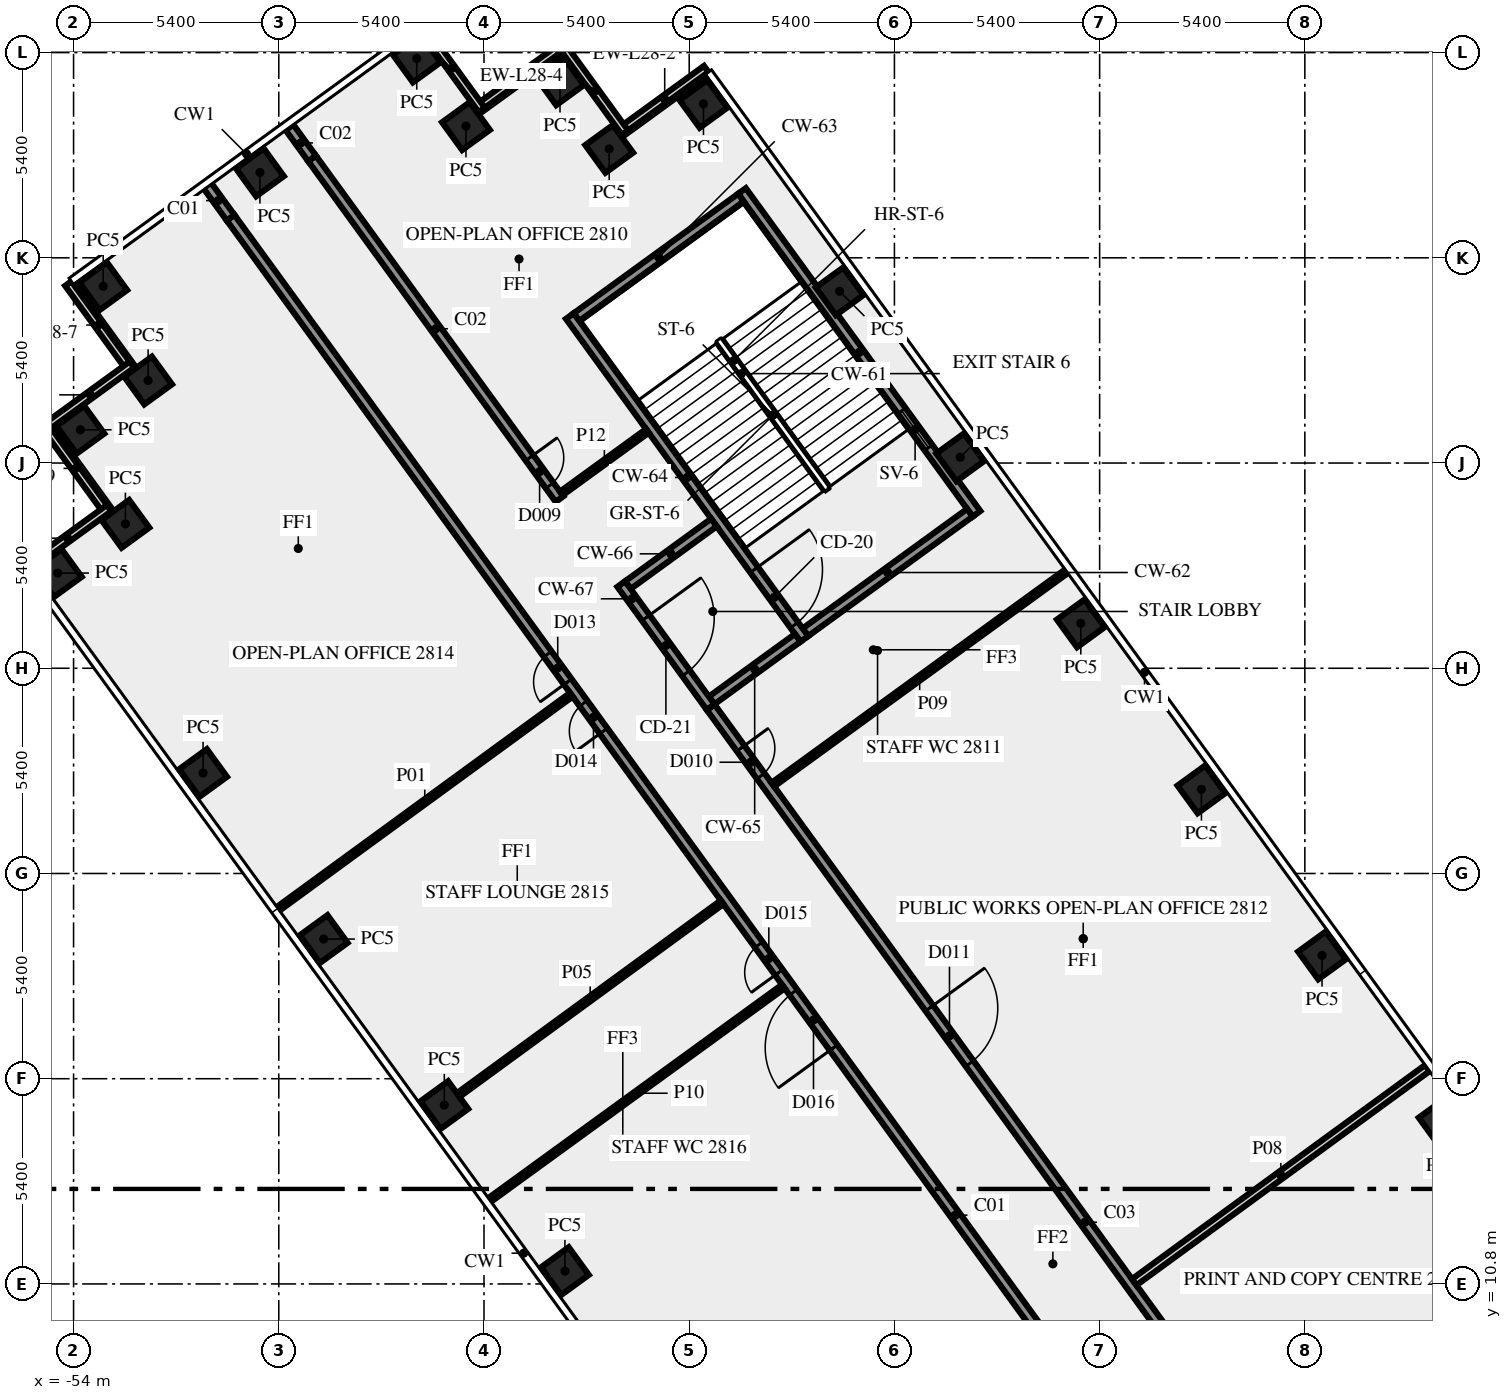
"""IFC4 building model, lengths in metres.
Left out: names, types, materials, properties, quantities, classifications, styles, units other than length and angle.
Written with IfcOpenShell. Run it as: python <this file> out.ifc"""

import sys

from ifc_helpers import new_model, si_unit, direction, frame, frame_2d, origin, origin_2d, place, context, subcontext, project, spatial, rectangle, extrude, element, fill, save


model = new_model("IFC4")
c1 = context("Model", 3, precision=1e-05, world=origin(), true_north=direction((0.0, 1.0)))
c2 = subcontext(c1, "Body", "Model", "MODEL_VIEW")
j1 = project(units=[si_unit("LENGTHUNIT", "METRE"), si_unit("PLANEANGLEUNIT", "RADIAN")], contexts=[c1])
p1 = place(None, origin())
s1 = spatial("IfcSite", under=j1, at=p1, CompositionType="ELEMENT")
p2 = place(p1, origin())
s2 = spatial("IfcBuilding", under=s1, at=p2, CompositionType="ELEMENT")
p3 = place(p2, frame((0.0, 0.0, 121.0)))
s3 = spatial("IfcBuildingStorey", under=s2, at=p3, CompositionType="ELEMENT", Elevation=121.0)
for number, where, z_axis, x_axis in (
    (1, (-17.974, 15.075, 0.0), (0.0, 0.0, 1.0), (-0.588, 0.809, 0.0)),
    (2, (-21.147, 19.444, 0.0), (0.0, 0.0, 1.0), (-0.588, 0.809, 0.0)),
    (3, (-24.321, 23.812, 0.0), (0.0, 0.0, 1.0), (-0.588, 0.809, 0.0)),
    (4, (-27.495, 28.181, 0.0), (0.0, 0.0, 1.0), (-0.588, 0.809, 0.0)),
    (5, (-30.669, 32.55, 0.0), (0.0, 0.0, 1.0), (-0.588, 0.809, 0.0)),
    (6, (-33.843, 36.919, 0.0), (0.0, 0.0, 1.0), (-0.588, 0.809, 0.0)),
    (7, (-37.425, 41.85, 0.0), (0.0, 0.0, 1.0), (-0.588, 0.809, 0.0)),
    (8, (-39.906, 40.666, 0.0), (0.0, 0.0, 1.0), (-0.588, 0.809, 0.0)),
    (9, (-41.2, 42.445, 0.0), (0.0, 0.0, 1.0), (-0.588, 0.809, 0.0)),
    (10, (-43.675, 41.265, 0.0), (0.0, 0.0, 1.0), (-0.809, -0.588, 0.0)),
    (11, (-44.97, 43.045, 0.0), (0.0, 0.0, 1.0), (-0.809, -0.588, 0.0)),
    (12, (-49.096, 40.047, 0.0), (0.0, 0.0, 1.0), (-0.809, -0.588, 0.0)),
    (13, (-53.22, 37.05, 0.0), (0.0, 0.0, 1.0), (0.588, -0.809, 0.0)),
    (14, (-52.039, 34.571, 0.0), (0.0, 0.0, 1.0), (-0.809, -0.588, 0.0)),
    (15, (-53.82, 33.275, 0.0), (0.0, 0.0, 1.0), (0.588, -0.809, 0.0)),
    (16, (-52.636, 30.8, 0.0), (0.0, 0.0, 1.0), (-0.809, -0.588, 0.0)),
    (17, (-54.415, 29.505, 0.0), (0.0, 0.0, 1.0), (0.588, -0.809, 0.0)),
    (18, (-50.592, 24.243, 0.0), (0.0, 0.0, 1.0), (0.588, -0.809, 0.0)),
    (19, (-47.418, 19.875, 0.0), (0.0, 0.0, 1.0), (0.588, -0.809, 0.0)),
    (20, (-44.244, 15.506, 0.0), (0.0, 0.0, 1.0), (0.588, -0.809, 0.0)),
    (21, (-41.07, 11.137, 0.0), (0.0, 0.0, 1.0), (0.588, -0.809, 0.0)),
):
    element("IfcColumn", number, at=place(p3, frame(where, z_axis=z_axis, x_axis=x_axis)), inside=s3, PredefinedType="COLUMN", context=c2, shape_type="SweptSolid", body=[
        extrude(rectangle(XDim=0.9, YDim=0.9, at=origin_2d()), origin(), (0.0, 0.0, 1.0), 3.65),
    ])
p4 = place(p3, frame((-37.353, 42.768, 0.0), z_axis=(0.0, 0.0, 1.0), x_axis=(-0.809033161865, -0.587762999008, 0.0)))
e22 = element("IfcWall", 22, at=p4, inside=s3, PredefinedType="SOLIDWALL", context=c2, shape_type="SweptSolid", body=[
    extrude(rectangle(XDim=2.7, YDim=0.2, at=frame_2d((1.35, 0.0))), origin(), (0.0, 0.0, 1.0), 3.65),
])
p5 = place(p3, frame((-39.488, 41.094, 0.0), z_axis=(0.0, 0.0, 1.0), x_axis=(-0.587806000234, 0.809001919707, 0.0)))
e23 = element("IfcWall", 23, at=p5, inside=s3, PredefinedType="SOLIDWALL", context=c2, shape_type="SweptSolid", body=[
    extrude(rectangle(XDim=2.7, YDim=0.2, at=frame_2d((1.35, 0.0))), origin(), (0.0, 0.0, 1.0), 3.65),
])
for number, where, z_axis, x_axis in (
    (24, (-41.124, 43.366, 0.0), (0.0, 0.0, 1.0), (-0.809, -0.588, 0.0)),
    (25, (-43.259, 41.691, 0.0), (0.0, 0.0, 1.0), (-0.588, 0.809, 0.0)),
    (26, (-54.14, 37.123, 0.0), (0.0, 0.0, 1.0), (0.588, -0.809, 0.0)),
    (27, (-52.465, 34.987, 0.0), (0.0, 0.0, 1.0), (-0.809, -0.588, 0.0)),
):
    element("IfcWall", number, at=place(p3, frame(where, z_axis=z_axis, x_axis=x_axis)), inside=s3, PredefinedType="SOLIDWALL", context=c2, shape_type="SweptSolid", body=[
        extrude(rectangle(XDim=2.7, YDim=0.2, at=frame_2d((1.35, 0.0))), origin(), (0.0, 0.0, 1.0), 3.65),
    ])
p6 = place(p3, frame((-54.738, 33.351, 0.0), z_axis=(0.0, 0.0, 1.0), x_axis=(0.587779184282, -0.809021403008, 0.0)))
e28 = element("IfcWall", 28, at=p6, inside=s3, PredefinedType="SOLIDWALL", context=c2, shape_type="SweptSolid", body=[
    extrude(rectangle(XDim=2.7, YDim=0.2, at=frame_2d((1.35, 0.0))), origin(), (0.0, 0.0, 1.0), 3.65),
])
p7 = place(p3, frame((-53.063, 31.216, 0.0), z_axis=(0.0, 0.0, 1.0), x_axis=(-0.809033161865, -0.587762999008, 0.0)))
e29 = element("IfcWall", 29, at=p7, inside=s3, PredefinedType="SOLIDWALL", context=c2, shape_type="SweptSolid", body=[
    extrude(rectangle(XDim=2.7, YDim=0.2, at=frame_2d((1.35, 0.0))), origin(), (0.0, 0.0, 1.0), 3.65),
])
p8 = place(p3, frame((-30.24, 31.064, 0.0), z_axis=(0.0, 0.0, 1.0), x_axis=(-0.587795589702, 0.809009483706, 0.0)))
e30 = element("IfcWall", 30, at=p8, inside=s3, PredefinedType="SHEAR", context=c2, shape_type="SweptSolid", body=[
    extrude(rectangle(XDim=10.5, YDim=0.25, at=frame_2d((5.25, 0.0))), origin(), (0.0, 0.0, 1.0), 3.65),
])
p9 = place(p8, frame((2.15, 0.0, 1.0)))
e31 = element("IfcOpeningElement", 31, at=p9, cuts=e30, PredefinedType="OPENING", context=c2, shape_type="SweptSolid", body=[
    extrude(rectangle(XDim=1.2, YDim=1.2, at=frame_2d((0.6, 0.6))), frame((0.0, 0.135, 0.0), z_axis=(0.0, -1.0, 0.0), x_axis=(1.0, 0.0, 0.0)), (0.0, 0.0, 1.0), 0.27),
])
p10 = place(p3, frame((-30.414, 31.092, 0.0), z_axis=(0.0, 0.0, 1.0), x_axis=(-0.8089984606, -0.587810760999, 0.0)))
e32 = element("IfcWall", 32, at=p10, inside=s3, PredefinedType="SHEAR", context=c2, shape_type="SweptSolid", body=[
    extrude(rectangle(XDim=5.35, YDim=0.25, at=frame_2d((2.675, 0.0))), origin(), (0.0, 0.0, 1.0), 3.65),
])
p11 = place(p3, frame((-36.439, 39.384, 0.0), z_axis=(0.0, 0.0, 1.0), x_axis=(-0.809020161303, -0.587780893365, 0.0)))
e33 = element("IfcWall", 33, at=p11, inside=s3, PredefinedType="SHEAR", context=c2, shape_type="SweptSolid", body=[
    extrude(rectangle(XDim=5.35, YDim=0.25, at=frame_2d((2.675, 0.0))), origin(), (0.0, 0.0, 1.0), 3.65),
])
p12 = place(p3, frame((-40.942, 36.267, 0.0), z_axis=(0.0, 0.0, 1.0), x_axis=(0.587795589702, -0.809009483706, 0.0)))
e34 = element("IfcWall", 34, at=p12, inside=s3, PredefinedType="SHEAR", context=c2, shape_type="SweptSolid", body=[
    extrude(rectangle(XDim=10.5, YDim=0.25, at=frame_2d((5.25, 0.0))), origin(), (0.0, 0.0, 1.0), 3.65),
])
p13 = place(p12, frame((8.25, 0.0, 0.0)))
e35 = element("IfcOpeningElement", 35, at=p13, cuts=e34, PredefinedType="OPENING", context=c2, shape_type="SweptSolid", body=[
    extrude(rectangle(XDim=1.8, YDim=2.1, at=frame_2d((0.9, 1.05))), frame((0.0, 0.135, 0.0), z_axis=(0.0, -1.0, 0.0), x_axis=(1.0, 0.0, 0.0)), (0.0, 0.0, 1.0), 0.27),
])
for number, where, z_axis, x_axis in (
    (36, (-34.945, 27.8, 0.0), (0.0, 0.0, 1.0), (-0.809, -0.588, 0.0)),
    (37, (-37.149, 30.834, 0.0), (0.0, 0.0, 1.0), (-0.809, -0.588, 0.0)),
):
    element("IfcWall", number, at=place(p3, frame(where, z_axis=z_axis, x_axis=x_axis)), inside=s3, PredefinedType="SHEAR", context=c2, shape_type="SweptSolid", body=[
        extrude(rectangle(XDim=2.8, YDim=0.25, at=frame_2d((1.4, 0.0))), origin(), (0.0, 0.0, 1.0), 3.65),
    ])
p14 = place(p3, frame((-39.589, 29.216, 0.0), z_axis=(0.0, 0.0, 1.0), x_axis=(0.587772420479, -0.809026317077, 0.0)))
e38 = element("IfcWall", 38, at=p14, inside=s3, PredefinedType="SHEAR", context=c2, shape_type="SweptSolid", body=[
    extrude(rectangle(XDim=4.0, YDim=0.25, at=frame_2d((2.0, 0.0))), origin(), (0.0, 0.0, 1.0), 3.65),
])
p15 = place(p14, frame((1.1, 0.0, 0.0)))
e39 = element("IfcOpeningElement", 39, at=p15, cuts=e38, PredefinedType="OPENING", context=c2, shape_type="SweptSolid", body=[
    extrude(rectangle(XDim=1.8, YDim=2.1, at=frame_2d((0.9, 1.05))), frame((0.0, 0.135, 0.0), z_axis=(0.0, -1.0, 0.0), x_axis=(1.0, 0.0, 0.0)), (0.0, 0.0, 1.0), 0.27),
])
p16 = place(p3, frame((-20.531, -1.523, 0.0), z_axis=(0.0, 0.0, 1.0), x_axis=(-0.587784522481, 0.809017524614, 0.0)))
e40 = element("IfcWall", 40, at=p16, inside=s3, PredefinedType="SOLIDWALL", context=c2, shape_type="SweptSolid", body=[
    extrude(rectangle(XDim=49.912, YDim=0.25, at=frame_2d((24.956, 0.0))), origin(), (0.0, 0.0, 1.0), 3.65),
])
p17 = place(p16, frame((34.816, 0.0, 0.0)))
e41 = element("IfcOpeningElement", 41, at=p17, cuts=e40, PredefinedType="OPENING", context=c2, shape_type="SweptSolid", body=[
    extrude(rectangle(XDim=0.9, YDim=2.1, at=frame_2d((0.45, 1.05))), frame((0.0, 0.135, 0.0), z_axis=(0.0, -1.0, 0.0), x_axis=(1.0, 0.0, 0.0)), (0.0, 0.0, 1.0), 0.27),
])
p18 = place(p16, frame((33.215, 0.0, 0.0)))
e42 = element("IfcOpeningElement", 42, at=p18, cuts=e40, PredefinedType="OPENING", context=c2, shape_type="SweptSolid", body=[
    extrude(rectangle(XDim=0.9, YDim=2.1, at=frame_2d((0.45, 1.05))), frame((0.0, 0.135, 0.0), z_axis=(0.0, -1.0, 0.0), x_axis=(1.0, 0.0, 0.0)), (0.0, 0.0, 1.0), 0.27),
])
p19 = place(p16, frame((22.916, 0.0, 0.0)))
e43 = element("IfcOpeningElement", 43, at=p19, cuts=e40, PredefinedType="OPENING", context=c2, shape_type="SweptSolid", body=[
    extrude(rectangle(XDim=1.8, YDim=2.1, at=frame_2d((0.9, 1.05))), frame((0.0, 0.135, 0.0), z_axis=(0.0, -1.0, 0.0), x_axis=(1.0, 0.0, 0.0)), (0.0, 0.0, 1.0), 0.27),
])
p20 = place(p16, frame((0.483, 0.0, 0.0)))
e44 = element("IfcOpeningElement", 44, at=p20, cuts=e40, PredefinedType="OPENING", context=c2, shape_type="SweptSolid", body=[
    extrude(rectangle(XDim=1.8, YDim=2.1, at=frame_2d((0.9, 1.05))), frame((0.0, 0.135, 0.0), z_axis=(0.0, -1.0, 0.0), x_axis=(1.0, 0.0, 0.0)), (0.0, 0.0, 1.0), 0.27),
])
p21 = place(p16, frame((25.365, 0.0, 0.0)))
e45 = element("IfcOpeningElement", 45, at=p21, cuts=e40, PredefinedType="OPENING", context=c2, shape_type="SweptSolid", body=[
    extrude(rectangle(XDim=0.9, YDim=2.1, at=frame_2d((0.45, 1.05))), frame((0.0, 0.135, 0.0), z_axis=(0.0, -1.0, 0.0), x_axis=(1.0, 0.0, 0.0)), (0.0, 0.0, 1.0), 0.27),
])
p22 = place(p3, frame((-47.725, 40.414, 0.0), z_axis=(0.0, 0.0, 1.0), x_axis=(0.587773291021, -0.809025684612, 0.0)))
e46 = element("IfcWall", 46, at=p22, inside=s3, PredefinedType="SOLIDWALL", context=c2, shape_type="SweptSolid", body=[
    extrude(rectangle(XDim=11.079, YDim=0.25, at=frame_2d((5.539, 0.0))), origin(), (0.0, 0.0, 1.0), 3.65),
])
p23 = place(p22, frame((9.737, 0.0, 0.0)))
e47 = element("IfcOpeningElement", 47, at=p23, cuts=e46, PredefinedType="OPENING", context=c2, shape_type="SweptSolid", body=[
    extrude(rectangle(XDim=0.9, YDim=2.1, at=frame_2d((0.45, 1.05))), frame((0.0, 0.135, 0.0), z_axis=(0.0, -1.0, 0.0), x_axis=(1.0, 0.0, 0.0)), (0.0, 0.0, 1.0), 0.27),
])
p24 = place(p3, frame((-37.232, 25.972, 0.0), z_axis=(0.0, 0.0, 1.0), x_axis=(0.587786323093, -0.809016216391, 0.0)))
e48 = element("IfcWall", 48, at=p24, inside=s3, PredefinedType="SOLIDWALL", context=c2, shape_type="SweptSolid", body=[
    extrude(rectangle(XDim=33.493, YDim=0.25, at=frame_2d((16.747, 0.0))), origin(), (0.0, 0.0, 1.0), 3.65),
])
p25 = place(p24, frame((9.785, 0.0, 0.0)))
e49 = element("IfcOpeningElement", 49, at=p25, cuts=e48, PredefinedType="OPENING", context=c2, shape_type="SweptSolid", body=[
    extrude(rectangle(XDim=1.8, YDim=2.1, at=frame_2d((0.9, 1.05))), frame((0.0, 0.135, 0.0), z_axis=(0.0, -1.0, 0.0), x_axis=(1.0, 0.0, 0.0)), (0.0, 0.0, 1.0), 0.27),
])
p26 = place(p24, frame((29.152, 0.0, 0.0)))
e50 = element("IfcOpeningElement", 50, at=p26, cuts=e48, PredefinedType="OPENING", context=c2, shape_type="SweptSolid", body=[
    extrude(rectangle(XDim=0.9, YDim=2.1, at=frame_2d((0.45, 1.05))), frame((0.0, 0.135, 0.0), z_axis=(0.0, -1.0, 0.0), x_axis=(1.0, 0.0, 0.0)), (0.0, 0.0, 1.0), 0.27),
])
p27 = place(p24, frame((1.335, 0.0, 0.0)))
e51 = element("IfcOpeningElement", 51, at=p27, cuts=e48, PredefinedType="OPENING", context=c2, shape_type="SweptSolid", body=[
    extrude(rectangle(XDim=0.9, YDim=2.1, at=frame_2d((0.45, 1.05))), frame((0.0, 0.135, 0.0), z_axis=(0.0, -1.0, 0.0), x_axis=(1.0, 0.0, 0.0)), (0.0, 0.0, 1.0), 0.27),
])
p28 = place(p3, frame((-48.615, 20.671, 0.0), z_axis=(0.0, 0.0, 1.0), x_axis=(0.807691251741, 0.589605666408, 0.0)))
e52 = element("IfcWall", 52, at=p28, inside=s3, PredefinedType="PARTITIONING", context=c2, shape_type="SweptSolid", body=[
    extrude(rectangle(XDim=9.55, YDim=0.12, at=frame_2d((4.775, 0.0))), origin(), (0.0, 0.0, 1.0), 2.75),
])
p29 = place(p3, frame((-43.876, 15.773, 0.0), z_axis=(0.0, 0.0, 1.0), x_axis=(0.807597163234, 0.589734535139, 0.0)))
e53 = element("IfcWall", 53, at=p29, inside=s3, PredefinedType="PARTITIONING", context=c2, shape_type="SweptSolid", body=[
    extrude(rectangle(XDim=8.595, YDim=0.12, at=frame_2d((4.298, 0.0))), origin(), (0.0, 0.0, 1.0), 3.65),
])
p30 = place(p3, frame((-26.089, 10.848, 0.0), z_axis=(0.0, 0.0, 1.0), x_axis=(0.807661302092, 0.589646691759, 0.0)))
e54 = element("IfcWall", 54, at=p30, inside=s3, PredefinedType="SOLIDWALL", context=c2, shape_type="SweptSolid", body=[
    extrude(rectangle(XDim=9.55, YDim=0.2, at=frame_2d((4.775, 0.0))), origin(), (0.0, 0.0, 1.0), 2.75),
])
p31 = place(p3, frame((-27.873, 29.551, 0.0), z_axis=(0.0, 0.0, 1.0), x_axis=(-0.809043311713, -0.587749027879, 0.0)))
e55 = element("IfcWall", 55, at=p31, inside=s3, PredefinedType="PARTITIONING", context=c2, shape_type="SweptSolid", body=[
    extrude(rectangle(XDim=9.55, YDim=0.12, at=frame_2d((4.775, 0.0))), origin(), (0.0, 0.0, 1.0), 2.75),
])
p32 = place(p3, frame((-35.324, 18.625, 0.0), z_axis=(0.0, 0.0, 1.0), x_axis=(-0.808998008689, -0.58781138296, 0.0)))
e56 = element("IfcWall", 56, at=p32, inside=s3, PredefinedType="PARTITIONING", context=c2, shape_type="SweptSolid", body=[
    extrude(rectangle(XDim=9.55, YDim=0.12, at=frame_2d((4.775, 0.0))), origin(), (0.0, 0.0, 1.0), 2.75),
])
p33 = place(p3, frame((-41.166, 31.599, 0.0), z_axis=(0.0, 0.0, 1.0), x_axis=(0.809090262332, 0.587684394381, 0.0)))
e57 = element("IfcWall", 57, at=p33, inside=s3, PredefinedType="PARTITIONING", context=c2, shape_type="SweptSolid", body=[
    extrude(rectangle(XDim=2.801, YDim=0.12, at=frame_2d((1.4, 0.0))), origin(), (0.0, 0.0, 1.0), 3.65),
])
p34 = place(p3, frame((-49.869, 38.856, 0.0), z_axis=(0.0, 0.0, 1.0), x_axis=(-0.587674273289, 0.809097613712, 0.0)))
e58 = element("IfcWall", 58, at=p34, inside=s3, PredefinedType="SOLIDWALL", context=c2, shape_type="SweptSolid", body=[
    extrude(rectangle(XDim=1.109, YDim=0.25, at=frame_2d((0.555, 0.0))), origin(), (0.0, 0.0, 1.0), 2.75),
])
p35 = place(p3, frame((-47.725, 40.414, 0.0), z_axis=(0.0, 0.0, 1.0), x_axis=(-0.587840411638, 0.808976915892, 0.0)))
e59 = element("IfcWall", 59, at=p35, inside=s3, PredefinedType="SOLIDWALL", context=c2, shape_type="SweptSolid", body=[
    extrude(rectangle(XDim=1.008, YDim=0.25, at=frame_2d((0.504, 0.0))), origin(), (0.0, 0.0, 1.0), 2.75),
])
p36 = place(p9, origin())
e60 = element("IfcWindow", 60, at=p36, inside=s3, PartitioningType="SINGLE_PANEL", PredefinedType="WINDOW", context=c2, shape_type="SweptSolid", body=[
    extrude(rectangle(XDim=1.2, YDim=1.2, at=frame_2d((0.6, 0.6))), frame((0.0, 0.03, 0.0), z_axis=(0.0, -1.0, 0.0), x_axis=(1.0, 0.0, 0.0)), (0.0, 0.0, 1.0), 0.06),
])
fill(e31, e60)
p37 = place(p13, origin())
e61 = element("IfcDoor", 61, at=p37, inside=s3, OperationType="DOUBLE_DOOR_SINGLE_SWING", PredefinedType="DOOR", context=c2, shape_type="SweptSolid", body=[
    extrude(rectangle(XDim=1.8, YDim=2.1, at=frame_2d((0.9, 1.05))), frame((0.0, 0.025, 0.0), z_axis=(0.0, -1.0, 0.0), x_axis=(1.0, 0.0, 0.0)), (0.0, 0.0, 1.0), 0.05),
])
fill(e35, e61)
p38 = place(p15, origin())
e62 = element("IfcDoor", 62, at=p38, inside=s3, OperationType="DOUBLE_DOOR_SINGLE_SWING", PredefinedType="DOOR", context=c2, shape_type="SweptSolid", body=[
    extrude(rectangle(XDim=1.8, YDim=2.1, at=frame_2d((0.9, 1.05))), frame((0.0, 0.025, 0.0), z_axis=(0.0, -1.0, 0.0), x_axis=(1.0, 0.0, 0.0)), (0.0, 0.0, 1.0), 0.05),
])
fill(e39, e62)
p39 = place(p23, origin())
e63 = element("IfcDoor", 63, at=p39, inside=s3, OperationType="SINGLE_SWING_RIGHT", PredefinedType="DOOR", context=c2, shape_type="SweptSolid", body=[
    extrude(rectangle(XDim=0.9, YDim=2.1, at=frame_2d((0.45, 1.05))), frame((0.0, 0.025, 0.0), z_axis=(0.0, -1.0, 0.0), x_axis=(1.0, 0.0, 0.0)), (0.0, 0.0, 1.0), 0.05),
])
fill(e47, e63)
p40 = place(p17, origin())
e64 = element("IfcDoor", 64, at=p40, inside=s3, OperationType="SINGLE_SWING_LEFT", PredefinedType="DOOR", context=c2, shape_type="SweptSolid", body=[
    extrude(rectangle(XDim=0.9, YDim=2.1, at=frame_2d((0.45, 1.05))), frame((0.0, 0.025, 0.0), z_axis=(0.0, -1.0, 0.0), x_axis=(1.0, 0.0, 0.0)), (0.0, 0.0, 1.0), 0.05),
])
fill(e41, e64)
p41 = place(p18, origin())
e65 = element("IfcDoor", 65, at=p41, inside=s3, OperationType="SINGLE_SWING_RIGHT", PredefinedType="DOOR", context=c2, shape_type="SweptSolid", body=[
    extrude(rectangle(XDim=0.9, YDim=2.1, at=frame_2d((0.45, 1.05))), frame((0.0, 0.025, 0.0), z_axis=(0.0, -1.0, 0.0), x_axis=(1.0, 0.0, 0.0)), (0.0, 0.0, 1.0), 0.05),
])
fill(e42, e65)
p42 = place(p25, origin())
e66 = element("IfcDoor", 66, at=p42, inside=s3, OperationType="DOUBLE_DOOR_SINGLE_SWING", PredefinedType="DOOR", context=c2, shape_type="SweptSolid", body=[
    extrude(rectangle(XDim=1.8, YDim=2.1, at=frame_2d((0.9, 1.05))), frame((0.0, 0.025, 0.0), z_axis=(0.0, -1.0, 0.0), x_axis=(1.0, 0.0, 0.0)), (0.0, 0.0, 1.0), 0.05),
])
fill(e49, e66)
p43 = place(p19, origin())
e67 = element("IfcDoor", 67, at=p43, inside=s3, OperationType="DOUBLE_DOOR_SINGLE_SWING", PredefinedType="DOOR", context=c2, shape_type="SweptSolid", body=[
    extrude(rectangle(XDim=1.8, YDim=2.1, at=frame_2d((0.9, 1.05))), frame((0.0, 0.025, 0.0), z_axis=(0.0, -1.0, 0.0), x_axis=(1.0, 0.0, 0.0)), (0.0, 0.0, 1.0), 0.05),
])
fill(e43, e67)
p44 = place(p27, origin())
e68 = element("IfcDoor", 68, at=p44, inside=s3, OperationType="SINGLE_SWING_RIGHT", PredefinedType="DOOR", context=c2, shape_type="SweptSolid", body=[
    extrude(rectangle(XDim=0.9, YDim=2.1, at=frame_2d((0.45, 1.05))), frame((0.0, 0.025, 0.0), z_axis=(0.0, -1.0, 0.0), x_axis=(1.0, 0.0, 0.0)), (0.0, 0.0, 1.0), 0.05),
])
fill(e51, e68)
p45 = place(p21, origin())
e69 = element("IfcDoor", 69, at=p45, inside=s3, OperationType="SINGLE_SWING_LEFT", PredefinedType="DOOR", context=c2, shape_type="SweptSolid", body=[
    extrude(rectangle(XDim=0.9, YDim=2.1, at=frame_2d((0.45, 1.05))), frame((0.0, 0.025, 0.0), z_axis=(0.0, -1.0, 0.0), x_axis=(1.0, 0.0, 0.0)), (0.0, 0.0, 1.0), 0.05),
])
fill(e45, e69)
save(model, sys.argv[1])
